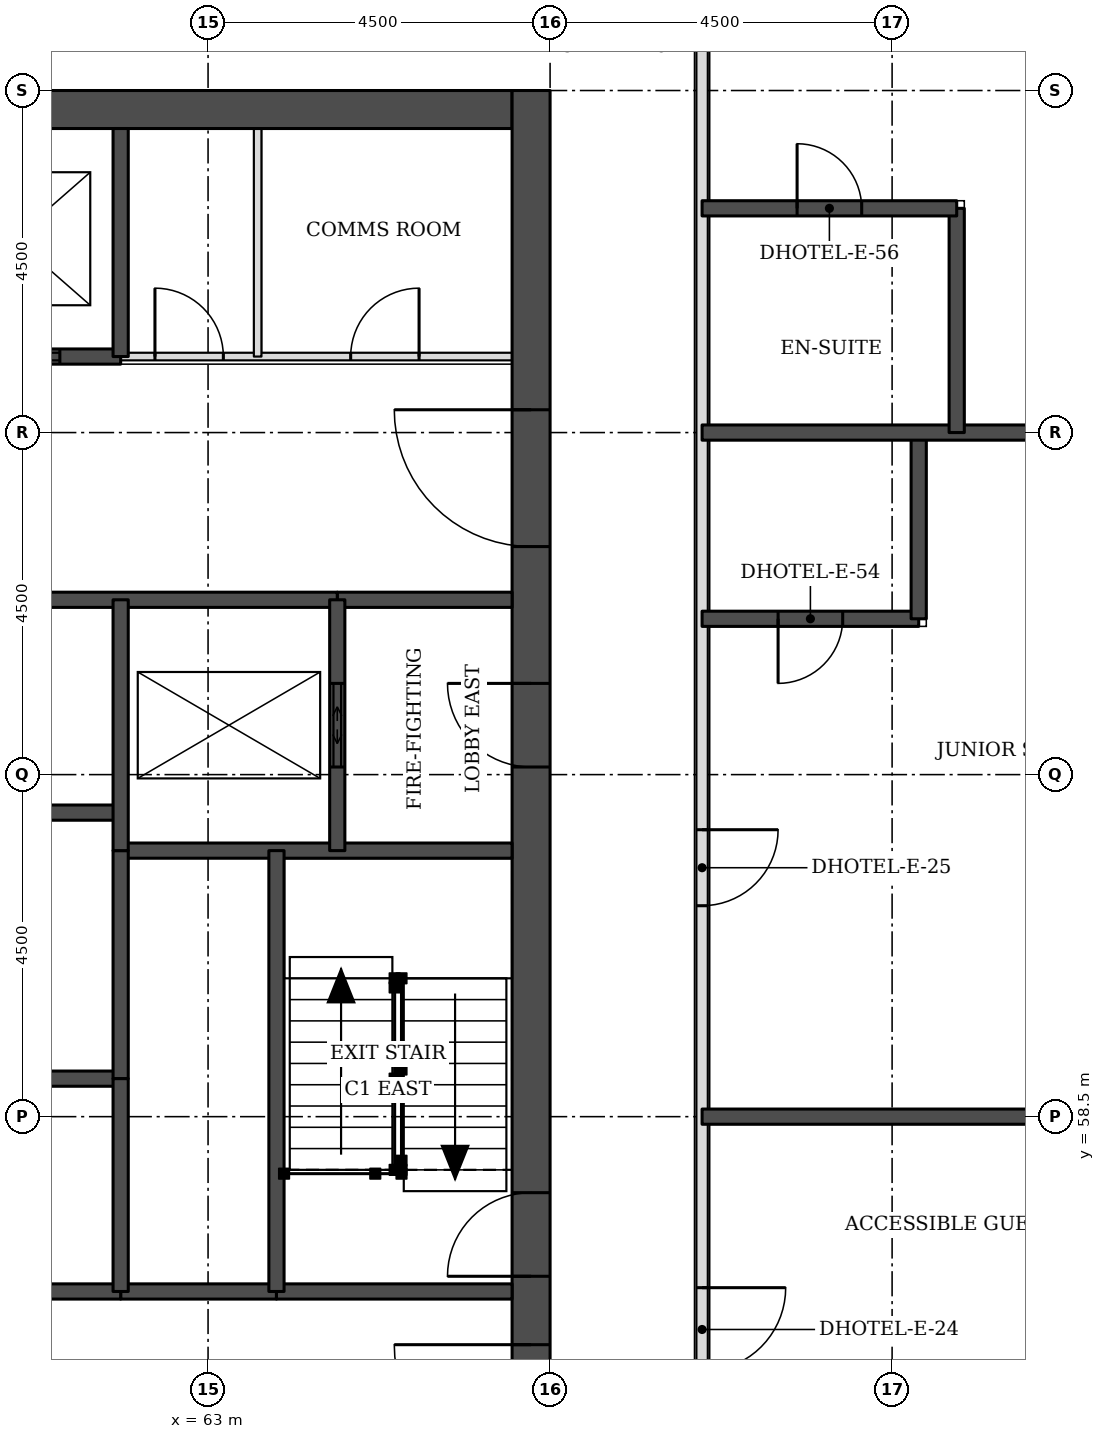
"""IFC4 building model, lengths in metres.
Left out: names, types, materials, properties, quantities, classifications, styles, units other than length and angle.
Written with IfcOpenShell. Run it as: python <this file> out.ifc"""

import sys

from ifc_helpers import new_model, si_unit, direction, frame, frame_2d, origin, place, context, subcontext, project, spatial, rectangle, extrude, element, fill, save


model = new_model("IFC4")
c1 = context("Model", 3, precision=1e-05, world=origin(), true_north=direction((0.0, 1.0)))
c2 = subcontext(c1, "Body", "Model", "MODEL_VIEW")
j1 = project(units=[si_unit("LENGTHUNIT", "METRE"), si_unit("PLANEANGLEUNIT", "RADIAN")], contexts=[c1])
p1 = place(None, origin())
s1 = spatial("IfcSite", under=j1, at=p1, CompositionType="ELEMENT")
p2 = place(p1, origin())
s2 = spatial("IfcBuilding", under=s1, at=p2, CompositionType="ELEMENT")
p3 = place(p2, frame((0.0, 0.0, 39.6)))
s3 = spatial("IfcBuildingStorey", under=s2, at=p3, CompositionType="ELEMENT", Elevation=39.6)
p4 = place(p3, frame((45.5, 71.75, 0.0), z_axis=(0.0, 0.0, 1.0), x_axis=(1.0, 0.0, 0.0)))
e1 = element("IfcWall", 1, at=p4, inside=s3, PredefinedType="SHEAR", context=c2, shape_type="SweptSolid", body=[
    extrude(rectangle(XDim=21.5, YDim=0.5, at=frame_2d((10.75, 0.0))), origin(), (0.0, 0.0, 1.0), 3.3),
])
p5 = place(p3, frame((67.25, 49.5, 0.0), z_axis=(0.0, 0.0, 1.0), x_axis=(0.0, 1.0, 0.0)))
e2 = element("IfcWall", 2, at=p5, inside=s3, PredefinedType="SHEAR", context=c2, shape_type="SweptSolid", body=[
    extrude(rectangle(XDim=22.5, YDim=0.5, at=frame_2d((11.25, 0.0))), origin(), (0.0, 0.0, 1.0), 3.3),
])
p6 = place(p5, frame((4.2, 0.0, 0.0)))
e3 = element("IfcOpeningElement", 3, at=p6, cuts=e2, PredefinedType="OPENING", context=c2, shape_type="SweptSolid", body=[
    extrude(rectangle(XDim=1.8, YDim=2.1, at=frame_2d((0.9, 1.05))), frame((0.0, 0.26, 0.0), z_axis=(0.0, -1.0, 0.0), x_axis=(1.0, 0.0, 0.0)), (0.0, 0.0, 1.0), 0.52),
])
p7 = place(p5, frame((6.9, 0.0, 0.0)))
e4 = element("IfcOpeningElement", 4, at=p7, cuts=e2, PredefinedType="OPENING", context=c2, shape_type="SweptSolid", body=[
    extrude(rectangle(XDim=1.1, YDim=2.1, at=frame_2d((0.55, 1.05))), frame((0.0, 0.26, 0.0), z_axis=(0.0, -1.0, 0.0), x_axis=(1.0, 0.0, 0.0)), (0.0, 0.0, 1.0), 0.52),
])
p8 = place(p5, frame((13.6, 0.0, 0.0)))
e5 = element("IfcOpeningElement", 5, at=p8, cuts=e2, PredefinedType="OPENING", context=c2, shape_type="SweptSolid", body=[
    extrude(rectangle(XDim=1.1, YDim=2.1, at=frame_2d((0.55, 1.05))), frame((0.0, 0.26, 0.0), z_axis=(0.0, -1.0, 0.0), x_axis=(1.0, 0.0, 0.0)), (0.0, 0.0, 1.0), 0.52),
])
p9 = place(p5, frame((16.5, 0.0, 0.0)))
e6 = element("IfcOpeningElement", 6, at=p9, cuts=e2, PredefinedType="OPENING", context=c2, shape_type="SweptSolid", body=[
    extrude(rectangle(XDim=1.8, YDim=2.1, at=frame_2d((0.9, 1.05))), frame((0.0, 0.26, 0.0), z_axis=(0.0, -1.0, 0.0), x_axis=(1.0, 0.0, 0.0)), (0.0, 0.0, 1.0), 0.52),
])
p10 = place(p3, frame((69.5, 47.5, 0.0), z_axis=(0.0, 0.0, 1.0), x_axis=(0.0, 1.0, 0.0)))
e7 = element("IfcWall", 7, at=p10, inside=s3, PredefinedType="PARTITIONING", context=c2, shape_type="SweptSolid", body=[
    extrude(rectangle(XDim=26.5, YDim=0.15, at=frame_2d((13.25, 0.0))), origin(), (0.0, 0.0, 1.0), 3.08),
])
p11 = place(p10, frame((25.053, 0.0, 0.0)))
e8 = element("IfcOpeningElement", 8, at=p11, cuts=e7, PredefinedType="OPENING", context=c2, shape_type="SweptSolid", body=[
    extrude(rectangle(XDim=1.0, YDim=2.1, at=frame_2d((0.5, 1.05))), frame((0.0, 0.085, 0.0), z_axis=(0.0, -1.0, 0.0), x_axis=(1.0, 0.0, 0.0)), (0.0, 0.0, 1.0), 0.17),
])
p12 = place(p10, frame((13.775, 0.0, 0.0)))
e9 = element("IfcOpeningElement", 9, at=p12, cuts=e7, PredefinedType="OPENING", context=c2, shape_type="SweptSolid", body=[
    extrude(rectangle(XDim=1.0, YDim=2.1, at=frame_2d((0.5, 1.05))), frame((0.0, 0.085, 0.0), z_axis=(0.0, -1.0, 0.0), x_axis=(1.0, 0.0, 0.0)), (0.0, 0.0, 1.0), 0.17),
])
p13 = place(p10, frame((7.65, 0.0, 0.0)))
e10 = element("IfcOpeningElement", 10, at=p13, cuts=e7, PredefinedType="OPENING", context=c2, shape_type="SweptSolid", body=[
    extrude(rectangle(XDim=1.1, YDim=2.1, at=frame_2d((0.55, 1.05))), frame((0.0, 0.085, 0.0), z_axis=(0.0, -1.0, 0.0), x_axis=(1.0, 0.0, 0.0)), (0.0, 0.0, 1.0), 0.17),
])
p14 = place(p10, frame((0.447, 0.0, 0.0)))
e11 = element("IfcOpeningElement", 11, at=p14, cuts=e7, PredefinedType="OPENING", context=c2, shape_type="SweptSolid", body=[
    extrude(rectangle(XDim=1.0, YDim=2.1, at=frame_2d((0.5, 1.05))), frame((0.0, 0.085, 0.0), z_axis=(0.0, -1.0, 0.0), x_axis=(1.0, 0.0, 0.0)), (0.0, 0.0, 1.0), 0.17),
])
p15 = place(p3, frame((69.5, 58.5, 0.0), z_axis=(0.0, 0.0, 1.0), x_axis=(1.0, 0.0, 0.0)))
e12 = element("IfcWall", 12, at=p15, inside=s3, PredefinedType="SOLIDWALL", context=c2, shape_type="SweptSolid", body=[
    extrude(rectangle(XDim=6.4, YDim=0.2, at=frame_2d((3.2, 0.0))), origin(), (0.0, 0.0, 1.0), 3.08),
])
p16 = place(p3, frame((69.5, 65.05, 0.0), z_axis=(0.0, 0.0, 1.0), x_axis=(1.0, 0.0, 0.0)))
e13 = element("IfcWall", 13, at=p16, inside=s3, PredefinedType="SOLIDWALL", context=c2, shape_type="SweptSolid", body=[
    extrude(rectangle(XDim=2.85, YDim=0.2, at=frame_2d((1.425, 0.0))), origin(), (0.0, 0.0, 1.0), 3.08),
])
p17 = place(p16, frame((1.0, 0.0, 0.0)))
e14 = element("IfcOpeningElement", 14, at=p17, cuts=e13, PredefinedType="OPENING", context=c2, shape_type="SweptSolid", body=[
    extrude(rectangle(XDim=0.85, YDim=2.1, at=frame_2d((0.425, 1.05))), frame((0.0, 0.11, 0.0), z_axis=(0.0, -1.0, 0.0), x_axis=(1.0, 0.0, 0.0)), (0.0, 0.0, 1.0), 0.22),
])
p18 = place(p3, frame((72.35, 65.05, 0.0), z_axis=(0.0, 0.0, 1.0), x_axis=(0.0, 1.0, 0.0)))
e15 = element("IfcWall", 15, at=p18, inside=s3, PredefinedType="SOLIDWALL", context=c2, shape_type="SweptSolid", body=[
    extrude(rectangle(XDim=2.45, YDim=0.2, at=frame_2d((1.225, 0.0))), origin(), (0.0, 0.0, 1.0), 3.08),
])
p19 = place(p3, frame((69.5, 67.5, 0.0), z_axis=(0.0, 0.0, 1.0), x_axis=(1.0, 0.0, 0.0)))
e16 = element("IfcWall", 16, at=p19, inside=s3, PredefinedType="SOLIDWALL", context=c2, shape_type="SweptSolid", body=[
    extrude(rectangle(XDim=6.4, YDim=0.2, at=frame_2d((3.2, 0.0))), origin(), (0.0, 0.0, 1.0), 3.08),
])
p20 = place(p3, frame((72.85, 67.5, 0.0), z_axis=(0.0, 0.0, 1.0), x_axis=(0.0, 1.0, 0.0)))
e17 = element("IfcWall", 17, at=p20, inside=s3, PredefinedType="SOLIDWALL", context=c2, shape_type="SweptSolid", body=[
    extrude(rectangle(XDim=2.95, YDim=0.2, at=frame_2d((1.475, 0.0))), origin(), (0.0, 0.0, 1.0), 3.08),
])
p21 = place(p3, frame((69.5, 70.45, 0.0), z_axis=(0.0, 0.0, 1.0), x_axis=(1.0, 0.0, 0.0)))
e18 = element("IfcWall", 18, at=p21, inside=s3, PredefinedType="SOLIDWALL", context=c2, shape_type="SweptSolid", body=[
    extrude(rectangle(XDim=3.35, YDim=0.2, at=frame_2d((1.675, 0.0))), origin(), (0.0, 0.0, 1.0), 3.08),
])
p22 = place(p21, frame((1.25, 0.0, 0.0)))
e19 = element("IfcOpeningElement", 19, at=p22, cuts=e18, PredefinedType="OPENING", context=c2, shape_type="SweptSolid", body=[
    extrude(rectangle(XDim=0.85, YDim=2.1, at=frame_2d((0.425, 1.05))), frame((0.0, 0.11, 0.0), z_axis=(0.0, -1.0, 0.0), x_axis=(1.0, 0.0, 0.0)), (0.0, 0.0, 1.0), 0.22),
])
p23 = place(p3, frame((61.85, 56.2, 0.0), z_axis=(0.0, 0.0, 1.0), x_axis=(1.0, 0.0, 0.0)))
e20 = element("IfcWall", 20, at=p23, inside=s3, PredefinedType="SOLIDWALL", context=c2, shape_type="SweptSolid", body=[
    extrude(rectangle(XDim=2.05, YDim=0.2, at=frame_2d((1.025, 0.0))), origin(), (0.0, 0.0, 1.0), 3.08),
])
p24 = place(p3, frame((50.65, 56.2, 0.0), z_axis=(0.0, 0.0, 1.0), x_axis=(1.0, 0.0, 0.0)))
e21 = element("IfcWall", 21, at=p24, inside=s3, PredefinedType="SOLIDWALL", context=c2, shape_type="SweptSolid", body=[
    extrude(rectangle(XDim=11.2, YDim=0.2, at=frame_2d((5.6, 0.0))), origin(), (0.0, 0.0, 1.0), 3.08),
])
p25 = place(p3, frame((63.9, 56.2, 0.0), z_axis=(0.0, 0.0, 1.0), x_axis=(1.0, 0.0, 0.0)))
e22 = element("IfcWall", 22, at=p25, inside=s3, PredefinedType="SOLIDWALL", context=c2, shape_type="SweptSolid", body=[
    extrude(rectangle(XDim=3.1, YDim=0.2, at=frame_2d((1.55, 0.0))), origin(), (0.0, 0.0, 1.0), 3.08),
])
p26 = place(p3, frame((50.65, 59.0, 0.0), z_axis=(0.0, 0.0, 1.0), x_axis=(1.0, 0.0, 0.0)))
e23 = element("IfcWall", 23, at=p26, inside=s3, PredefinedType="SOLIDWALL", context=c2, shape_type="SweptSolid", body=[
    extrude(rectangle(XDim=11.2, YDim=0.2, at=frame_2d((5.6, 0.0))), origin(), (0.0, 0.0, 1.0), 3.3),
])
p27 = place(p3, frame((61.85, 62.0, 0.0), z_axis=(0.0, 0.0, 1.0), x_axis=(1.0, 0.0, 0.0)))
e24 = element("IfcWall", 24, at=p27, inside=s3, PredefinedType="SOLIDWALL", context=c2, shape_type="SweptSolid", body=[
    extrude(rectangle(XDim=5.15, YDim=0.2, at=frame_2d((2.575, 0.0))), origin(), (0.0, 0.0, 1.0), 3.08),
])
p28 = place(p3, frame((50.65, 62.5, 0.0), z_axis=(0.0, 0.0, 1.0), x_axis=(1.0, 0.0, 0.0)))
e25 = element("IfcWall", 25, at=p28, inside=s3, PredefinedType="SOLIDWALL", context=c2, shape_type="SweptSolid", body=[
    extrude(rectangle(XDim=11.2, YDim=0.2, at=frame_2d((5.6, 0.0))), origin(), (0.0, 0.0, 1.0), 3.3),
])
p29 = place(p3, frame((64.7, 65.3, 0.0), z_axis=(0.0, 0.0, 1.0), x_axis=(1.0, 0.0, 0.0)))
e26 = element("IfcWall", 26, at=p29, inside=s3, PredefinedType="SOLIDWALL", context=c2, shape_type="SweptSolid", body=[
    extrude(rectangle(XDim=2.3, YDim=0.2, at=frame_2d((1.15, 0.0))), origin(), (0.0, 0.0, 1.0), 3.08),
])
p30 = place(p3, frame((47.8, 65.3, 0.0), z_axis=(0.0, 0.0, 1.0), x_axis=(1.0, 0.0, 0.0)))
e27 = element("IfcWall", 27, at=p30, inside=s3, PredefinedType="SOLIDWALL", context=c2, shape_type="SweptSolid", body=[
    extrude(rectangle(XDim=16.9, YDim=0.2, at=frame_2d((8.45, 0.0))), origin(), (0.0, 0.0, 1.0), 3.08),
])
p31 = place(p3, frame((61.85, 68.5, 0.0), z_axis=(0.0, 0.0, 1.0), x_axis=(1.0, 0.0, 0.0)))
e28 = element("IfcWall", 28, at=p31, inside=s3, PredefinedType="PARTITIONING", context=c2, shape_type="SweptSolid", body=[
    extrude(rectangle(XDim=5.15, YDim=0.1, at=frame_2d((2.575, 0.0))), origin(), (0.0, 0.0, 1.0), 3.08),
])
p32 = place(p31, frame((3.026, 0.0, 0.0)))
e29 = element("IfcOpeningElement", 29, at=p32, cuts=e28, PredefinedType="OPENING", context=c2, shape_type="SweptSolid", body=[
    extrude(rectangle(XDim=0.9, YDim=2.1, at=frame_2d((0.45, 1.05))), frame((0.0, 0.06, 0.0), z_axis=(0.0, -1.0, 0.0), x_axis=(1.0, 0.0, 0.0)), (0.0, 0.0, 1.0), 0.12),
])
p33 = place(p31, frame((0.451, 0.0, 0.0)))
e30 = element("IfcOpeningElement", 30, at=p33, cuts=e28, PredefinedType="OPENING", context=c2, shape_type="SweptSolid", body=[
    extrude(rectangle(XDim=0.9, YDim=2.1, at=frame_2d((0.45, 1.05))), frame((0.0, 0.06, 0.0), z_axis=(0.0, -1.0, 0.0), x_axis=(1.0, 0.0, 0.0)), (0.0, 0.0, 1.0), 0.12),
])
p34 = place(p3, frame((50.65, 68.5, 0.0), z_axis=(0.0, 0.0, 1.0), x_axis=(1.0, 0.0, 0.0)))
e31 = element("IfcWall", 31, at=p34, inside=s3, PredefinedType="SOLIDWALL", context=c2, shape_type="SweptSolid", body=[
    extrude(rectangle(XDim=11.2, YDim=0.2, at=frame_2d((5.6, 0.0))), origin(), (0.0, 0.0, 1.0), 3.08),
])
p35 = place(p34, frame((0.8, 0.0, 0.0)))
e32 = element("IfcOpeningElement", 32, at=p35, cuts=e31, PredefinedType="OPENING", context=c2, shape_type="SweptSolid", body=[
    extrude(rectangle(XDim=1.2, YDim=2.1, at=frame_2d((0.6, 1.05))), frame((0.0, 0.11, 0.0), z_axis=(0.0, -1.0, 0.0), x_axis=(1.0, 0.0, 0.0)), (0.0, 0.0, 1.0), 0.22),
])
p36 = place(p34, frame((3.6, 0.0, 0.0)))
e33 = element("IfcOpeningElement", 33, at=p36, cuts=e31, PredefinedType="OPENING", context=c2, shape_type="SweptSolid", body=[
    extrude(rectangle(XDim=1.2, YDim=2.1, at=frame_2d((0.6, 1.05))), frame((0.0, 0.11, 0.0), z_axis=(0.0, -1.0, 0.0), x_axis=(1.0, 0.0, 0.0)), (0.0, 0.0, 1.0), 0.22),
])
p37 = place(p34, frame((6.4, 0.0, 0.0)))
e34 = element("IfcOpeningElement", 34, at=p37, cuts=e31, PredefinedType="OPENING", context=c2, shape_type="SweptSolid", body=[
    extrude(rectangle(XDim=1.2, YDim=2.1, at=frame_2d((0.6, 1.05))), frame((0.0, 0.11, 0.0), z_axis=(0.0, -1.0, 0.0), x_axis=(1.0, 0.0, 0.0)), (0.0, 0.0, 1.0), 0.22),
])
p38 = place(p34, frame((9.2, 0.0, 0.0)))
e35 = element("IfcOpeningElement", 35, at=p38, cuts=e31, PredefinedType="OPENING", context=c2, shape_type="SweptSolid", body=[
    extrude(rectangle(XDim=1.2, YDim=2.1, at=frame_2d((0.6, 1.05))), frame((0.0, 0.11, 0.0), z_axis=(0.0, -1.0, 0.0), x_axis=(1.0, 0.0, 0.0)), (0.0, 0.0, 1.0), 0.22),
])
p39 = place(p3, frame((61.85, 59.0, 0.0), z_axis=(0.0, 0.0, 1.0), x_axis=(0.0, 1.0, 0.0)))
e36 = element("IfcWall", 36, at=p39, inside=s3, PredefinedType="SOLIDWALL", context=c2, shape_type="SweptSolid", body=[
    extrude(rectangle(XDim=3.0, YDim=0.2, at=frame_2d((1.5, 0.0))), origin(), (0.0, 0.0, 1.0), 3.3),
])
p40 = place(p3, frame((61.85, 56.2, 0.0), z_axis=(0.0, 0.0, 1.0), x_axis=(0.0, 1.0, 0.0)))
e37 = element("IfcWall", 37, at=p40, inside=s3, PredefinedType="SOLIDWALL", context=c2, shape_type="SweptSolid", body=[
    extrude(rectangle(XDim=2.8, YDim=0.2, at=frame_2d((1.4, 0.0))), origin(), (0.0, 0.0, 1.0), 3.08),
])
p41 = place(p3, frame((61.85, 62.0, 0.0), z_axis=(0.0, 0.0, 1.0), x_axis=(0.0, 1.0, 0.0)))
e38 = element("IfcWall", 38, at=p41, inside=s3, PredefinedType="SOLIDWALL", context=c2, shape_type="SweptSolid", body=[
    extrude(rectangle(XDim=3.3, YDim=0.2, at=frame_2d((1.65, 0.0))), origin(), (0.0, 0.0, 1.0), 3.08),
])
p42 = place(p3, frame((61.85, 68.5, 0.0), z_axis=(0.0, 0.0, 1.0), x_axis=(0.0, 1.0, 0.0)))
e39 = element("IfcWall", 39, at=p42, inside=s3, PredefinedType="SOLIDWALL", context=c2, shape_type="SweptSolid", body=[
    extrude(rectangle(XDim=3.0, YDim=0.2, at=frame_2d((1.5, 0.0))), origin(), (0.0, 0.0, 1.0), 3.08),
])
p43 = place(p3, frame((63.653, 68.5, 0.0), z_axis=(0.0, 0.0, 1.0), x_axis=(0.0, 1.0, 0.0)))
e40 = element("IfcWall", 40, at=p43, inside=s3, PredefinedType="PARTITIONING", context=c2, shape_type="SweptSolid", body=[
    extrude(rectangle(XDim=3.0, YDim=0.1, at=frame_2d((1.5, 0.0))), origin(), (0.0, 0.0, 1.0), 3.08),
])
p44 = place(p3, frame((63.9, 56.2, 0.0), z_axis=(0.0, 0.0, 1.0), x_axis=(0.0, 1.0, 0.0)))
e41 = element("IfcWall", 41, at=p44, inside=s3, PredefinedType="SOLIDWALL", context=c2, shape_type="SweptSolid", body=[
    extrude(rectangle(XDim=5.8, YDim=0.2, at=frame_2d((2.9, 0.0))), origin(), (0.0, 0.0, 1.0), 3.08),
])
p45 = place(p3, frame((64.7, 62.0, 0.0), z_axis=(0.0, 0.0, 1.0), x_axis=(0.0, 1.0, 0.0)))
e42 = element("IfcWall", 42, at=p45, inside=s3, PredefinedType="SOLIDWALL", context=c2, shape_type="SweptSolid", body=[
    extrude(rectangle(XDim=3.3, YDim=0.2, at=frame_2d((1.65, 0.0))), origin(), (0.0, 0.0, 1.0), 3.08),
])
p46 = place(p45, frame((1.1, 0.0, 0.0)))
e43 = element("IfcOpeningElement", 43, at=p46, cuts=e42, PredefinedType="OPENING", context=c2, shape_type="SweptSolid", body=[
    extrude(rectangle(XDim=1.1, YDim=2.1, at=frame_2d((0.55, 1.05))), frame((0.0, 0.11, 0.0), z_axis=(0.0, -1.0, 0.0), x_axis=(1.0, 0.0, 0.0)), (0.0, 0.0, 1.0), 0.22),
])
p47 = place(p22, origin())
e44 = element("IfcDoor", 44, at=p47, inside=s3, OperationType="SINGLE_SWING_LEFT", PredefinedType="DOOR", context=c2, shape_type="SweptSolid", body=[
    extrude(rectangle(XDim=0.85, YDim=2.1, at=frame_2d((0.425, 1.05))), frame((0.0, 0.025, 0.0), z_axis=(0.0, -1.0, 0.0), x_axis=(1.0, 0.0, 0.0)), (0.0, 0.0, 1.0), 0.05),
])
fill(e19, e44)
p48 = place(p12, frame((1.0, 0.0, 0.0), z_axis=(0.0, 0.0, 1.0), x_axis=(-1.0, 0.0, 0.0)))
e45 = element("IfcDoor", 45, at=p48, inside=s3, OperationType="SINGLE_SWING_LEFT", PredefinedType="DOOR", context=c2, shape_type="SweptSolid", body=[
    extrude(rectangle(XDim=1.0, YDim=2.1, at=frame_2d((0.5, 1.05))), frame((0.0, 0.025, 0.0), z_axis=(0.0, -1.0, 0.0), x_axis=(1.0, 0.0, 0.0)), (0.0, 0.0, 1.0), 0.05),
])
fill(e9, e45)
p49 = place(p17, frame((0.85, 0.0, 0.0), z_axis=(0.0, 0.0, 1.0), x_axis=(-1.0, 0.0, 0.0)))
e46 = element("IfcDoor", 46, at=p49, inside=s3, OperationType="SINGLE_SWING_RIGHT", PredefinedType="DOOR", context=c2, shape_type="SweptSolid", body=[
    extrude(rectangle(XDim=0.85, YDim=2.1, at=frame_2d((0.425, 1.05))), frame((0.0, 0.025, 0.0), z_axis=(0.0, -1.0, 0.0), x_axis=(1.0, 0.0, 0.0)), (0.0, 0.0, 1.0), 0.05),
])
fill(e14, e46)
p50 = place(p13, frame((1.1, 0.0, 0.0), z_axis=(0.0, 0.0, 1.0), x_axis=(-1.0, 0.0, 0.0)))
e47 = element("IfcDoor", 47, at=p50, inside=s3, OperationType="SINGLE_SWING_LEFT", PredefinedType="DOOR", context=c2, shape_type="SweptSolid", body=[
    extrude(rectangle(XDim=1.1, YDim=2.1, at=frame_2d((0.55, 1.05))), frame((0.0, 0.025, 0.0), z_axis=(0.0, -1.0, 0.0), x_axis=(1.0, 0.0, 0.0)), (0.0, 0.0, 1.0), 0.05),
])
fill(e10, e47)
p51 = place(p38, origin())
e48 = element("IfcDoor", 48, at=p51, inside=s3, OperationType="DOUBLE_DOOR_SLIDING", PredefinedType="DOOR", context=c2, shape_type="SweptSolid", body=[
    extrude(rectangle(XDim=1.2, YDim=2.1, at=frame_2d((0.6, 1.05))), frame((0.0, 0.025, 0.0), z_axis=(0.0, -1.0, 0.0), x_axis=(1.0, 0.0, 0.0)), (0.0, 0.0, 1.0), 0.05),
])
fill(e35, e48)
p52 = place(p46, origin())
e49 = element("IfcDoor", 49, at=p52, inside=s3, OperationType="DOUBLE_DOOR_SLIDING", PredefinedType="DOOR", context=c2, shape_type="SweptSolid", body=[
    extrude(rectangle(XDim=1.1, YDim=2.1, at=frame_2d((0.55, 1.05))), frame((0.0, 0.025, 0.0), z_axis=(0.0, -1.0, 0.0), x_axis=(1.0, 0.0, 0.0)), (0.0, 0.0, 1.0), 0.05),
])
fill(e43, e49)
p53 = place(p6, origin())
e50 = element("IfcDoor", 50, at=p53, inside=s3, OperationType="SINGLE_SWING_RIGHT", PredefinedType="DOOR", context=c2, shape_type="SweptSolid", body=[
    extrude(rectangle(XDim=1.8, YDim=2.1, at=frame_2d((0.9, 1.05))), frame((0.0, 0.025, 0.0), z_axis=(0.0, -1.0, 0.0), x_axis=(1.0, 0.0, 0.0)), (0.0, 0.0, 1.0), 0.05),
])
fill(e3, e50)
p54 = place(p7, origin())
e51 = element("IfcDoor", 51, at=p54, inside=s3, OperationType="SINGLE_SWING_LEFT", PredefinedType="DOOR", context=c2, shape_type="SweptSolid", body=[
    extrude(rectangle(XDim=1.1, YDim=2.1, at=frame_2d((0.55, 1.05))), frame((0.0, 0.025, 0.0), z_axis=(0.0, -1.0, 0.0), x_axis=(1.0, 0.0, 0.0)), (0.0, 0.0, 1.0), 0.05),
])
fill(e4, e51)
p55 = place(p8, origin())
e52 = element("IfcDoor", 52, at=p55, inside=s3, OperationType="SINGLE_SWING_RIGHT", PredefinedType="DOOR", context=c2, shape_type="SweptSolid", body=[
    extrude(rectangle(XDim=1.1, YDim=2.1, at=frame_2d((0.55, 1.05))), frame((0.0, 0.025, 0.0), z_axis=(0.0, -1.0, 0.0), x_axis=(1.0, 0.0, 0.0)), (0.0, 0.0, 1.0), 0.05),
])
fill(e5, e52)
p56 = place(p9, origin())
e53 = element("IfcDoor", 53, at=p56, inside=s3, OperationType="SINGLE_SWING_RIGHT", PredefinedType="DOOR", context=c2, shape_type="SweptSolid", body=[
    extrude(rectangle(XDim=1.8, YDim=2.1, at=frame_2d((0.9, 1.05))), frame((0.0, 0.025, 0.0), z_axis=(0.0, -1.0, 0.0), x_axis=(1.0, 0.0, 0.0)), (0.0, 0.0, 1.0), 0.05),
])
fill(e6, e53)
p57 = place(p32, origin())
e54 = element("IfcDoor", 54, at=p57, inside=s3, OperationType="SINGLE_SWING_RIGHT", PredefinedType="DOOR", context=c2, shape_type="SweptSolid", body=[
    extrude(rectangle(XDim=0.9, YDim=2.1, at=frame_2d((0.45, 1.05))), frame((0.0, 0.025, 0.0), z_axis=(0.0, -1.0, 0.0), x_axis=(1.0, 0.0, 0.0)), (0.0, 0.0, 1.0), 0.05),
])
fill(e29, e54)
p58 = place(p33, origin())
e55 = element("IfcDoor", 55, at=p58, inside=s3, OperationType="SINGLE_SWING_LEFT", PredefinedType="DOOR", context=c2, shape_type="SweptSolid", body=[
    extrude(rectangle(XDim=0.9, YDim=2.1, at=frame_2d((0.45, 1.05))), frame((0.0, 0.025, 0.0), z_axis=(0.0, -1.0, 0.0), x_axis=(1.0, 0.0, 0.0)), (0.0, 0.0, 1.0), 0.05),
])
fill(e30, e55)
save(model, sys.argv[1])
